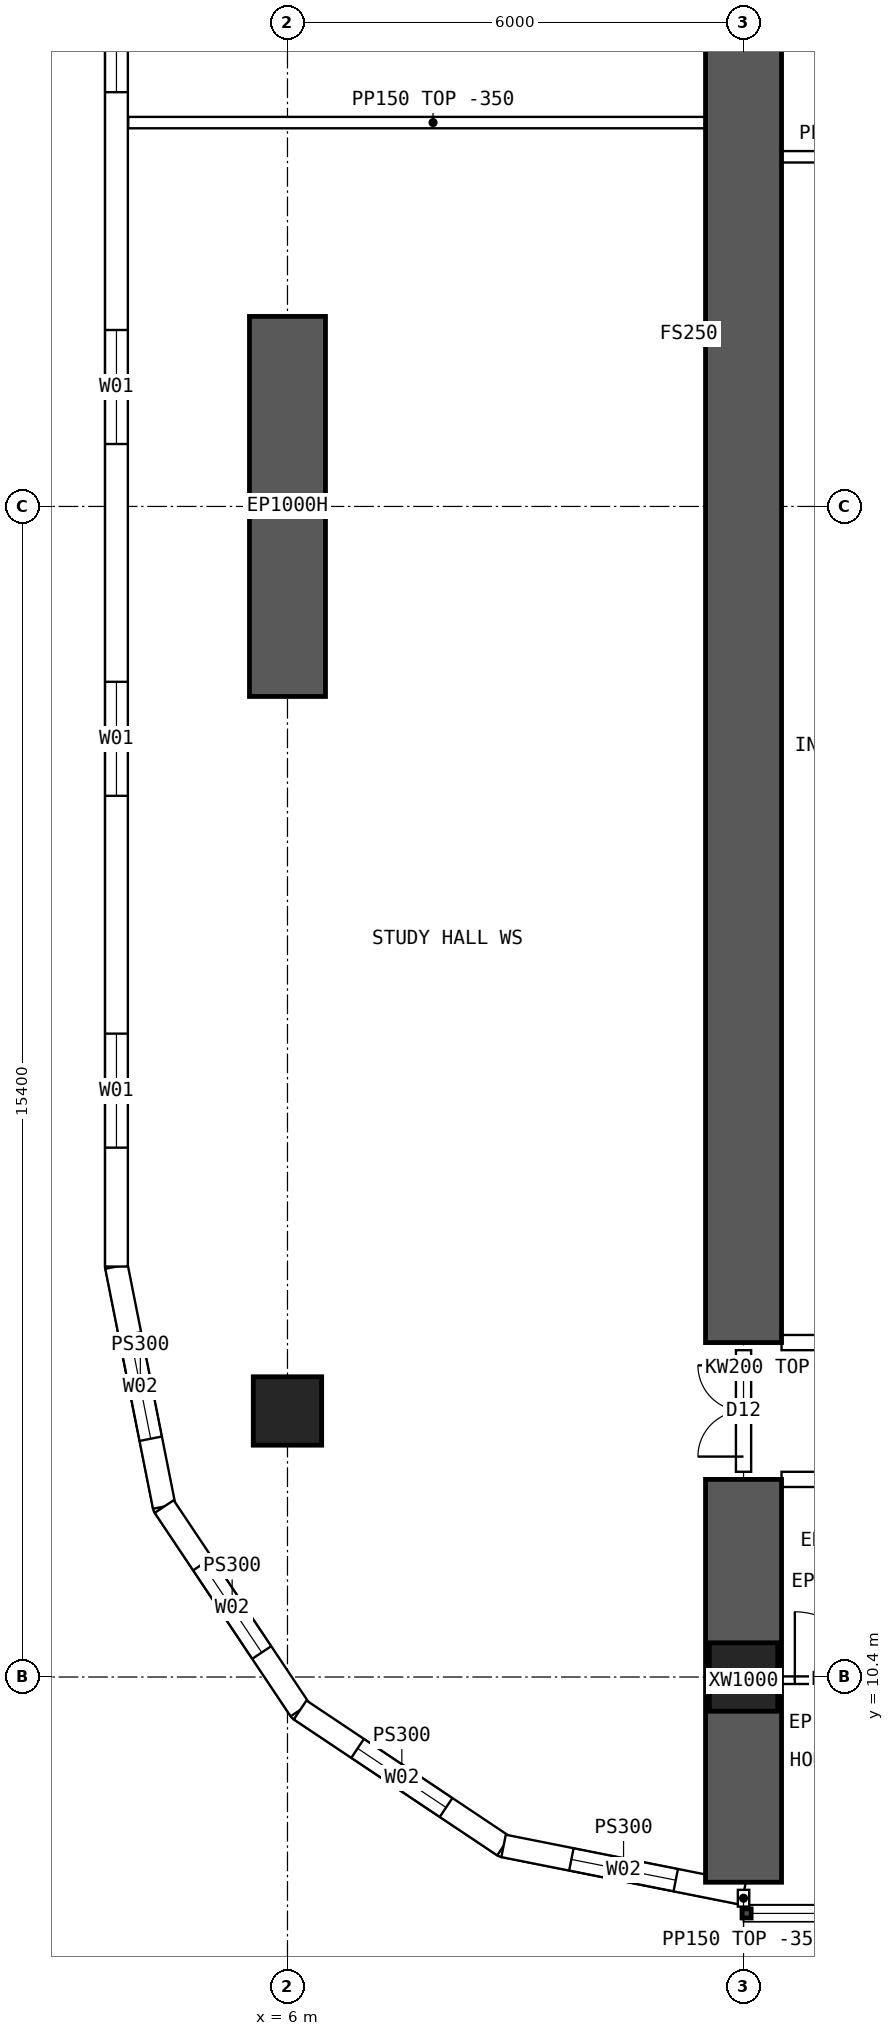
"""IFC4 building model, lengths in metres.
Left out: names, types, materials, properties, quantities, classifications, styles, units other than length and angle.
Written with IfcOpenShell. Run it as: python <this file> out.ifc"""

import sys

from ifc_helpers import new_model, si_unit, direction, frame, frame_2d, origin, origin_2d, place, context, subcontext, project, spatial, polyline, rectangle, hollow_rectangle, outline, extrude, element, fill, save


model = new_model("IFC4")
c1 = context("Model", 3, precision=1e-05, world=origin(), true_north=direction((0.0, 1.0)))
c2 = subcontext(c1, "Body", "Model", "MODEL_VIEW")
j1 = project(units=[si_unit("LENGTHUNIT", "METRE"), si_unit("PLANEANGLEUNIT", "RADIAN")], contexts=[c1])
p1 = place(None, origin())
s1 = spatial("IfcSite", under=j1, at=p1, CompositionType="ELEMENT")
p2 = place(p1, origin())
s2 = spatial("IfcBuilding", under=s1, at=p2, CompositionType="ELEMENT")
p3 = place(p2, frame((0.0, 0.0, 65.2)))
s3 = spatial("IfcBuildingStorey", under=s2, at=p3, CompositionType="ELEMENT", Elevation=65.2)
for number, where, z_axis, x_axis in (
    (1, (12.0, 10.4, 0.0), (0.0, 0.0, 1.0), (1.0, 0.0, 0.0)),
    (2, (6.0, 13.9, 0.0), (0.0, 0.0, 1.0), (1.0, 0.0, 0.0)),
):
    element("IfcColumn", number, at=place(p3, frame(where, z_axis=z_axis, x_axis=x_axis)), inside=s3, PredefinedType="COLUMN", context=c2, shape_type="SweptSolid", body=[
        extrude(hollow_rectangle(XDim=0.9, YDim=0.9, WallThickness=0.09, at=origin_2d()), origin(), (0.0, 0.0, 1.0), 3.75),
    ])
p4 = place(p3, frame((6.0, 23.3, 0.0), z_axis=(0.0, 0.0, 1.0), x_axis=(0.0, 1.0, 0.0)))
e3 = element("IfcWall", 3, at=p4, inside=s3, PredefinedType="SHEAR", context=c2, shape_type="SweptSolid", body=[
    extrude(rectangle(XDim=5.0, YDim=1.0, at=frame_2d((2.5, 0.0))), origin(), (0.0, 0.0, 1.0), 3.75),
])
p5 = place(p3, frame((12.0, 7.7, 0.0), z_axis=(0.0, 0.0, 1.0), x_axis=(0.0, 1.0, 0.0)))
e4 = element("IfcWall", 4, at=p5, inside=s3, PredefinedType="SHEAR", context=c2, shape_type="SweptSolid", body=[
    extrude(rectangle(XDim=5.3, YDim=1.0, at=frame_2d((2.65, 0.0))), origin(), (0.0, 0.0, 1.0), 3.75),
])
p6 = place(p3, frame((12.0, 14.8, 0.0), z_axis=(0.0, 0.0, 1.0), x_axis=(0.0, 1.0, 0.0)))
e5 = element("IfcWall", 5, at=p6, inside=s3, PredefinedType="SHEAR", context=c2, shape_type="SweptSolid", body=[
    extrude(rectangle(XDim=34.4, YDim=1.0, at=frame_2d((17.2, 0.0))), origin(), (0.0, 0.0, 1.0), 3.75),
])
p7 = place(p3, frame((3.75, 48.2, 0.0), z_axis=(0.0, 0.0, 1.0), x_axis=(0.0, -1.0, 0.0)))
e6 = element("IfcWall", 6, at=p7, inside=s3, PredefinedType="SOLIDWALL", context=c2, shape_type="SweptSolid", body=[
    extrude(outline(polyline([(-0.015, -0.15), (32.415, -0.15), (32.385, 0.15), (0.015, 0.15), (-0.015, -0.15)])), origin(), (0.0, 0.0, 1.0), 3.4),
])
p8 = place(p7, frame((1.564, 0.0, 0.9)))
e7 = element("IfcOpeningElement", 7, at=p8, cuts=e6, PredefinedType="OPENING", context=c2, shape_type="SweptSolid", body=[
    extrude(rectangle(XDim=1.5, YDim=2.0, at=frame_2d((0.75, 1.0))), frame((0.0, 0.16, 0.0), z_axis=(0.0, -1.0, 0.0), x_axis=(1.0, 0.0, 0.0)), (0.0, 0.0, 1.0), 0.32),
])
p9 = place(p7, frame((6.193, 0.0, 0.9)))
e8 = element("IfcOpeningElement", 8, at=p9, cuts=e6, PredefinedType="OPENING", context=c2, shape_type="SweptSolid", body=[
    extrude(rectangle(XDim=1.5, YDim=2.0, at=frame_2d((0.75, 1.0))), frame((0.0, 0.16, 0.0), z_axis=(0.0, -1.0, 0.0), x_axis=(1.0, 0.0, 0.0)), (0.0, 0.0, 1.0), 0.32),
])
p10 = place(p7, frame((10.822, 0.0, 0.9)))
e9 = element("IfcOpeningElement", 9, at=p10, cuts=e6, PredefinedType="OPENING", context=c2, shape_type="SweptSolid", body=[
    extrude(rectangle(XDim=1.5, YDim=2.0, at=frame_2d((0.75, 1.0))), frame((0.0, 0.16, 0.0), z_axis=(0.0, -1.0, 0.0), x_axis=(1.0, 0.0, 0.0)), (0.0, 0.0, 1.0), 0.32),
])
p11 = place(p7, frame((15.45, 0.0, 0.9)))
e10 = element("IfcOpeningElement", 10, at=p11, cuts=e6, PredefinedType="OPENING", context=c2, shape_type="SweptSolid", body=[
    extrude(rectangle(XDim=1.5, YDim=2.0, at=frame_2d((0.75, 1.0))), frame((0.0, 0.16, 0.0), z_axis=(0.0, -1.0, 0.0), x_axis=(1.0, 0.0, 0.0)), (0.0, 0.0, 1.0), 0.32),
])
p12 = place(p7, frame((20.079, 0.0, 0.9)))
e11 = element("IfcOpeningElement", 11, at=p12, cuts=e6, PredefinedType="OPENING", context=c2, shape_type="SweptSolid", body=[
    extrude(rectangle(XDim=1.5, YDim=2.0, at=frame_2d((0.75, 1.0))), frame((0.0, 0.16, 0.0), z_axis=(0.0, -1.0, 0.0), x_axis=(1.0, 0.0, 0.0)), (0.0, 0.0, 1.0), 0.32),
])
p13 = place(p7, frame((24.707, 0.0, 0.9)))
e12 = element("IfcOpeningElement", 12, at=p13, cuts=e6, PredefinedType="OPENING", context=c2, shape_type="SweptSolid", body=[
    extrude(rectangle(XDim=1.5, YDim=2.0, at=frame_2d((0.75, 1.0))), frame((0.0, 0.16, 0.0), z_axis=(0.0, -1.0, 0.0), x_axis=(1.0, 0.0, 0.0)), (0.0, 0.0, 1.0), 0.32),
])
p14 = place(p7, frame((29.336, 0.0, 0.9)))
e13 = element("IfcOpeningElement", 13, at=p14, cuts=e6, PredefinedType="OPENING", context=c2, shape_type="SweptSolid", body=[
    extrude(rectangle(XDim=1.5, YDim=2.0, at=frame_2d((0.75, 1.0))), frame((0.0, 0.16, 0.0), z_axis=(0.0, -1.0, 0.0), x_axis=(1.0, 0.0, 0.0)), (0.0, 0.0, 1.0), 0.32),
])
p15 = place(p3, frame((3.75, 15.8, 0.0), z_axis=(0.0, 0.0, 1.0), x_axis=(0.195065901187, -0.980790137692, 0.0)))
e14 = element("IfcWall", 14, at=p15, inside=s3, PredefinedType="SOLIDWALL", context=c2, shape_type="SweptSolid", body=[
    extrude(outline(polyline([(-0.015, -0.15), (3.249, -0.15), (3.189, 0.15), (0.015, 0.15), (-0.015, -0.15)])), origin(), (0.0, 0.0, 1.0), 3.4),
])
p16 = place(p15, frame((0.909, 0.0, 0.9)))
e15 = element("IfcOpeningElement", 15, at=p16, cuts=e14, PredefinedType="OPENING", context=c2, shape_type="SweptSolid", body=[
    extrude(rectangle(XDim=1.4, YDim=1.8, at=frame_2d((0.7, 0.9))), frame((0.0, 0.16, 0.0), z_axis=(0.0, -1.0, 0.0), x_axis=(1.0, 0.0, 0.0)), (0.0, 0.0, 1.0), 0.32),
])
p17 = place(p3, frame((4.378, 12.643, 0.0), z_axis=(0.0, 0.0, 1.0), x_axis=(0.555609954424, -0.831443069936, 0.0)))
e16 = element("IfcWall", 16, at=p17, inside=s3, PredefinedType="SOLIDWALL", context=c2, shape_type="SweptSolid", body=[
    extrude(outline(polyline([(-0.03, -0.15), (3.249, -0.15), (3.189, 0.15), (0.03, 0.15), (-0.03, -0.15)])), origin(), (0.0, 0.0, 1.0), 3.4),
])
p18 = place(p17, frame((0.909, 0.0, 0.9)))
e17 = element("IfcOpeningElement", 17, at=p18, cuts=e16, PredefinedType="OPENING", context=c2, shape_type="SweptSolid", body=[
    extrude(rectangle(XDim=1.4, YDim=1.8, at=frame_2d((0.7, 0.9))), frame((0.0, 0.16, 0.0), z_axis=(0.0, -1.0, 0.0), x_axis=(1.0, 0.0, 0.0)), (0.0, 0.0, 1.0), 0.32),
])
p19 = place(p3, frame((6.167, 9.966, 0.0), z_axis=(0.0, 0.0, 1.0), x_axis=(0.831478105043, -0.555557522525, 0.0)))
e18 = element("IfcWall", 18, at=p19, inside=s3, PredefinedType="SOLIDWALL", context=c2, shape_type="SweptSolid", body=[
    extrude(outline(polyline([(-0.03, -0.15), (3.249, -0.15), (3.189, 0.15), (0.03, 0.15), (-0.03, -0.15)])), origin(), (0.0, 0.0, 1.0), 3.4),
])
p20 = place(p19, frame((0.909, 0.0, 0.9)))
e19 = element("IfcOpeningElement", 19, at=p20, cuts=e18, PredefinedType="OPENING", context=c2, shape_type="SweptSolid", body=[
    extrude(rectangle(XDim=1.4, YDim=1.8, at=frame_2d((0.7, 0.9))), frame((0.0, 0.16, 0.0), z_axis=(0.0, -1.0, 0.0), x_axis=(1.0, 0.0, 0.0)), (0.0, 0.0, 1.0), 0.32),
])
p21 = place(p3, frame((8.843, 8.178, 0.0), z_axis=(0.0, 0.0, 1.0), x_axis=(0.980787251524, -0.195080412259, 0.0)))
e20 = element("IfcWall", 20, at=p21, inside=s3, PredefinedType="SOLIDWALL", context=c2, shape_type="SweptSolid", body=[
    extrude(outline(polyline([(-0.03, -0.15), (3.249, -0.15), (3.189, 0.15), (0.03, 0.15), (-0.03, -0.15)])), origin(), (0.0, 0.0, 1.0), 3.4),
])
p22 = place(p21, frame((0.909, 0.0, 0.9)))
e21 = element("IfcOpeningElement", 21, at=p22, cuts=e20, PredefinedType="OPENING", context=c2, shape_type="SweptSolid", body=[
    extrude(rectangle(XDim=1.4, YDim=1.8, at=frame_2d((0.7, 0.9))), frame((0.0, 0.16, 0.0), z_axis=(0.0, -1.0, 0.0), x_axis=(1.0, 0.0, 0.0)), (0.0, 0.0, 1.0), 0.32),
])
p23 = place(p3, frame((12.5, 13.0, 0.0), z_axis=(0.0, 0.0, 1.0), x_axis=(1.0, 0.0, 0.0)))
e22 = element("IfcWall", 22, at=p23, inside=s3, PredefinedType="SOLIDWALL", context=c2, shape_type="SweptSolid", body=[
    extrude(outline(polyline([(0.0, 0.0), (5.0, 0.0), (5.0, 3.0), (0.0, 3.0), (0.0, 0.0)])), frame((0.0, 0.1, 0.0), z_axis=(0.0, -1.0, 0.0), x_axis=(1.0, 0.0, 0.0)), (0.0, 0.0, 1.0), 0.2),
])
p24 = place(p23, frame((1.3, 0.0, 0.0)))
e23 = element("IfcOpeningElement", 23, at=p24, cuts=e22, PredefinedType="OPENING", context=c2, shape_type="SweptSolid", body=[
    extrude(rectangle(XDim=0.9, YDim=2.1, at=frame_2d((0.45, 1.05))), frame((0.0, 0.11, 0.0), z_axis=(0.0, -1.0, 0.0), x_axis=(1.0, 0.0, 0.0)), (0.0, 0.0, 1.0), 0.22),
])
p25 = place(p23, frame((2.675, 0.0, 0.0)))
e24 = element("IfcOpeningElement", 24, at=p25, cuts=e22, PredefinedType="OPENING", context=c2, shape_type="SweptSolid", body=[
    extrude(rectangle(XDim=0.9, YDim=2.1, at=frame_2d((0.45, 1.05))), frame((0.0, 0.11, 0.0), z_axis=(0.0, -1.0, 0.0), x_axis=(1.0, 0.0, 0.0)), (0.0, 0.0, 1.0), 0.22),
])
p26 = place(p3, frame((12.5, 14.8, 0.0), z_axis=(0.0, 0.0, 1.0), x_axis=(1.0, 0.0, 0.0)))
e25 = element("IfcWall", 25, at=p26, inside=s3, PredefinedType="SOLIDWALL", context=c2, shape_type="SweptSolid", body=[
    extrude(rectangle(XDim=5.0, YDim=0.2, at=frame_2d((2.5, 0.0))), origin(), (0.0, 0.0, 1.0), 3.4),
])
p27 = place(p26, frame((3.3, 0.0, 0.0)))
e26 = element("IfcOpeningElement", 26, at=p27, cuts=e25, PredefinedType="OPENING", context=c2, shape_type="SweptSolid", body=[
    extrude(rectangle(XDim=1.6, YDim=2.1, at=frame_2d((0.8, 1.05))), frame((0.0, 0.11, 0.0), z_axis=(0.0, -1.0, 0.0), x_axis=(1.0, 0.0, 0.0)), (0.0, 0.0, 1.0), 0.22),
])
p28 = place(p3, frame((13.75, 10.358, 0.0), z_axis=(0.0, 0.0, 1.0), x_axis=(-1.0, 0.0, 0.0)))
e27 = element("IfcWall", 27, at=p28, inside=s3, PredefinedType="PARTITIONING", context=c2, shape_type="SweptSolid", body=[
    extrude(outline(polyline([(0.0, 0.0), (1.3, 0.0), (1.3, 3.0), (0.0, 3.0), (0.0, 0.0)])), frame((0.0, 0.05, 0.0), z_axis=(0.0, -1.0, 0.0), x_axis=(1.0, 0.0, 0.0)), (0.0, 0.0, 1.0), 0.1),
])
p29 = place(p28, frame((0.175, 0.0, 0.0)))
e28 = element("IfcOpeningElement", 28, at=p29, cuts=e27, PredefinedType="OPENING", context=c2, shape_type="SweptSolid", body=[
    extrude(rectangle(XDim=0.9, YDim=2.1, at=frame_2d((0.45, 1.05))), frame((0.0, 0.06, 0.0), z_axis=(0.0, -1.0, 0.0), x_axis=(1.0, 0.0, 0.0)), (0.0, 0.0, 1.0), 0.12),
])
p30 = place(p3, frame((12.0, 30.4, 0.0), z_axis=(0.0, 0.0, 1.0), x_axis=(1.0, 0.0, 0.0)))
e29 = element("IfcWall", 29, at=p30, inside=s3, PredefinedType="PARTITIONING", context=c2, shape_type="SweptSolid", body=[
    extrude(rectangle(XDim=3.6, YDim=0.15, at=frame_2d((1.8, 0.0))), origin(), (0.0, 0.0, 1.0), 3.4),
])
p31 = place(p3, frame((3.905, 30.85, 0.0), z_axis=(0.0, 0.0, 1.0), x_axis=(1.0, 0.0, 0.0)))
e30 = element("IfcWall", 30, at=p31, inside=s3, PredefinedType="PARTITIONING", context=c2, shape_type="SweptSolid", body=[
    extrude(outline(polyline([(0.0, 0.0), (8.02, 0.0), (8.02, 3.4), (2.397, 3.4), (2.395, 2.95), (1.797, 2.95), (1.795, 3.4), (0.0, 3.4), (0.0, 0.0)])), frame((0.0, 0.075, 0.0), z_axis=(0.0, -1.0, 0.0), x_axis=(1.0, 0.0, 0.0)), (0.0, 0.0, 1.0), 0.15),
])
p32 = place(p3, frame((12.0, 13.1, 0.0), z_axis=(0.0, 0.0, 1.0), x_axis=(0.0, 1.0, 0.0)))
e31 = element("IfcWall", 31, at=p32, inside=s3, PredefinedType="SOLIDWALL", context=c2, shape_type="SweptSolid", body=[
    extrude(outline(polyline([(0.0, 0.0), (1.6, 0.0), (1.6, 2.95), (0.0, 2.95), (0.0, 0.0)])), frame((0.0, 0.1, 0.0), z_axis=(0.0, -1.0, 0.0), x_axis=(1.0, 0.0, 0.0)), (0.0, 0.0, 1.0), 0.2),
])
p33 = place(p32, frame((0.2, 0.0, 0.0)))
e32 = element("IfcOpeningElement", 32, at=p33, cuts=e31, PredefinedType="OPENING", context=c2, shape_type="SweptSolid", body=[
    extrude(rectangle(XDim=1.2, YDim=2.1, at=frame_2d((0.6, 1.05))), frame((0.0, 0.11, 0.0), z_axis=(0.0, -1.0, 0.0), x_axis=(1.0, 0.0, 0.0)), (0.0, 0.0, 1.0), 0.22),
])
p34 = place(p3, frame((12.0, 7.6, 0.0), z_axis=(0.0, 0.0, 1.0), x_axis=(0.0, -1.0, 0.0)))
e33 = element("IfcWall", 33, at=p34, inside=s3, PredefinedType="PARTITIONING", context=c2, shape_type="SweptSolid", body=[
    extrude(rectangle(XDim=0.22, YDim=0.15, at=frame_2d((0.11, 0.0))), origin(), (0.0, 0.0, 1.0), 3.4),
])
p35 = place(p11, origin())
e34 = element("IfcWindow", 34, at=p35, inside=s3, PartitioningType="SINGLE_PANEL", PredefinedType="WINDOW", context=c2, shape_type="SweptSolid", body=[
    extrude(rectangle(XDim=1.5, YDim=2.0, at=frame_2d((0.75, 1.0))), frame((0.0, 0.03, 0.0), z_axis=(0.0, -1.0, 0.0), x_axis=(1.0, 0.0, 0.0)), (0.0, 0.0, 1.0), 0.06),
])
fill(e10, e34)
p36 = place(p12, origin())
e35 = element("IfcWindow", 35, at=p36, inside=s3, PartitioningType="SINGLE_PANEL", PredefinedType="WINDOW", context=c2, shape_type="SweptSolid", body=[
    extrude(rectangle(XDim=1.5, YDim=2.0, at=frame_2d((0.75, 1.0))), frame((0.0, 0.03, 0.0), z_axis=(0.0, -1.0, 0.0), x_axis=(1.0, 0.0, 0.0)), (0.0, 0.0, 1.0), 0.06),
])
fill(e11, e35)
p37 = place(p13, origin())
e36 = element("IfcWindow", 36, at=p37, inside=s3, PartitioningType="SINGLE_PANEL", PredefinedType="WINDOW", context=c2, shape_type="SweptSolid", body=[
    extrude(rectangle(XDim=1.5, YDim=2.0, at=frame_2d((0.75, 1.0))), frame((0.0, 0.03, 0.0), z_axis=(0.0, -1.0, 0.0), x_axis=(1.0, 0.0, 0.0)), (0.0, 0.0, 1.0), 0.06),
])
fill(e12, e36)
p38 = place(p14, origin())
e37 = element("IfcWindow", 37, at=p38, inside=s3, PartitioningType="SINGLE_PANEL", PredefinedType="WINDOW", context=c2, shape_type="SweptSolid", body=[
    extrude(rectangle(XDim=1.5, YDim=2.0, at=frame_2d((0.75, 1.0))), frame((0.0, 0.03, 0.0), z_axis=(0.0, -1.0, 0.0), x_axis=(1.0, 0.0, 0.0)), (0.0, 0.0, 1.0), 0.06),
])
fill(e13, e37)
p39 = place(p16, origin())
e38 = element("IfcWindow", 38, at=p39, inside=s3, PartitioningType="SINGLE_PANEL", PredefinedType="WINDOW", context=c2, shape_type="SweptSolid", body=[
    extrude(rectangle(XDim=1.4, YDim=1.8, at=frame_2d((0.7, 0.9))), frame((0.0, 0.03, 0.0), z_axis=(0.0, -1.0, 0.0), x_axis=(1.0, 0.0, 0.0)), (0.0, 0.0, 1.0), 0.06),
])
fill(e15, e38)
p40 = place(p18, origin())
e39 = element("IfcWindow", 39, at=p40, inside=s3, PartitioningType="SINGLE_PANEL", PredefinedType="WINDOW", context=c2, shape_type="SweptSolid", body=[
    extrude(rectangle(XDim=1.4, YDim=1.8, at=frame_2d((0.7, 0.9))), frame((0.0, 0.03, 0.0), z_axis=(0.0, -1.0, 0.0), x_axis=(1.0, 0.0, 0.0)), (0.0, 0.0, 1.0), 0.06),
])
fill(e17, e39)
p41 = place(p20, origin())
e40 = element("IfcWindow", 40, at=p41, inside=s3, PartitioningType="SINGLE_PANEL", PredefinedType="WINDOW", context=c2, shape_type="SweptSolid", body=[
    extrude(rectangle(XDim=1.4, YDim=1.8, at=frame_2d((0.7, 0.9))), frame((0.0, 0.03, 0.0), z_axis=(0.0, -1.0, 0.0), x_axis=(1.0, 0.0, 0.0)), (0.0, 0.0, 1.0), 0.06),
])
fill(e19, e40)
p42 = place(p22, origin())
e41 = element("IfcWindow", 41, at=p42, inside=s3, PartitioningType="SINGLE_PANEL", PredefinedType="WINDOW", context=c2, shape_type="SweptSolid", body=[
    extrude(rectangle(XDim=1.4, YDim=1.8, at=frame_2d((0.7, 0.9))), frame((0.0, 0.03, 0.0), z_axis=(0.0, -1.0, 0.0), x_axis=(1.0, 0.0, 0.0)), (0.0, 0.0, 1.0), 0.06),
])
fill(e21, e41)
p43 = place(p29, origin())
e42 = element("IfcDoor", 42, at=p43, inside=s3, OperationType="SINGLE_SWING_RIGHT", PredefinedType="DOOR", context=c2, shape_type="SweptSolid", body=[
    extrude(rectangle(XDim=0.9, YDim=2.1, at=frame_2d((0.45, 1.05))), frame((0.0, 0.025, 0.0), z_axis=(0.0, -1.0, 0.0), x_axis=(1.0, 0.0, 0.0)), (0.0, 0.0, 1.0), 0.05),
])
fill(e28, e42)
p44 = place(p33, origin())
e43 = element("IfcDoor", 43, at=p44, inside=s3, OperationType="DOUBLE_DOOR_SINGLE_SWING", PredefinedType="DOOR", context=c2, shape_type="SweptSolid", body=[
    extrude(rectangle(XDim=1.2, YDim=2.1, at=frame_2d((0.6, 1.05))), frame((0.0, 0.025, 0.0), z_axis=(0.0, -1.0, 0.0), x_axis=(1.0, 0.0, 0.0)), (0.0, 0.0, 1.0), 0.05),
])
fill(e32, e43)
save(model, sys.argv[1])
